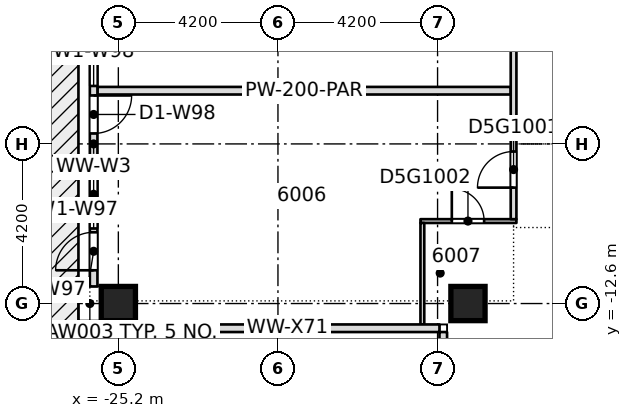
"""IFC4 building model, lengths in metres.
Left out: names, types, materials, properties, quantities, classifications, styles, units other than length and angle.
Written with IfcOpenShell. Run it as: python <this file> out.ifc"""

import sys

from ifc_helpers import new_model, si_unit, direction, frame, frame_2d, origin, origin_2d, place, context, subcontext, project, spatial, rectangle, extrude, element, fill, save


model = new_model("IFC4")
c1 = context("Model", 3, precision=1e-05, world=origin(), true_north=direction((0.0, 1.0)))
c2 = subcontext(c1, "Body", "Model", "MODEL_VIEW")
j1 = project(units=[si_unit("LENGTHUNIT", "METRE"), si_unit("PLANEANGLEUNIT", "RADIAN")], contexts=[c1])
p1 = place(None, origin())
s1 = spatial("IfcSite", under=j1, at=p1, CompositionType="ELEMENT")
p2 = place(p1, origin())
s2 = spatial("IfcBuilding", under=s1, at=p2, CompositionType="ELEMENT")
p3 = place(p2, frame((0.0, 0.0, 230.35)))
s3 = spatial("IfcBuildingStorey", under=s2, at=p3, CompositionType="ELEMENT", Elevation=230.35)
for number, where, z_axis, x_axis in (
    (1, (-25.2, -12.6, -0.4), (0.0, 0.0, 1.0), (1.0, 0.0, 0.0)),
    (2, (-16.0, -12.6, -0.4), (0.0, 0.0, 1.0), (1.0, 0.0, 0.0)),
):
    element("IfcColumn", number, at=place(p3, frame(where, z_axis=z_axis, x_axis=x_axis)), inside=s3, PredefinedType="COLUMN", context=c2, shape_type="SweptSolid", body=[
        extrude(rectangle(XDim=0.9, YDim=0.9, at=origin_2d()), origin(), (0.0, 0.0, 1.0), 3.45),
    ])
p4 = place(p3, frame((-17.25, -10.43, 0.0), z_axis=(0.0, 0.0, 1.0), x_axis=(1.0, 0.0, 0.0)))
e3 = element("IfcWall", 3, at=p4, inside=s3, PredefinedType="PARTITIONING", context=c2, shape_type="SweptSolid", body=[
    extrude(rectangle(XDim=2.525, YDim=0.1, at=frame_2d((1.262, 0.0))), origin(), (0.0, 0.0, 1.0), 3.05),
])
p5 = place(p4, frame((0.825, 0.0, 0.0)))
e4 = element("IfcOpeningElement", 4, at=p5, cuts=e3, PredefinedType="OPENING", context=c2, shape_type="SweptSolid", body=[
    extrude(rectangle(XDim=0.85, YDim=2.1, at=frame_2d((0.425, 1.05))), frame((0.0, 0.06, 0.0), z_axis=(0.0, -1.0, 0.0), x_axis=(1.0, 0.0, 0.0)), (0.0, 0.0, 1.0), 0.12),
])
p6 = place(p3, frame((-25.75, -7.0, 0.0), z_axis=(0.0, 0.0, 1.0), x_axis=(1.0, 0.0, 0.0)))
e5 = element("IfcWall", 5, at=p6, inside=s3, PredefinedType="PARTITIONING", context=c2, shape_type="SweptSolid", body=[
    extrude(rectangle(XDim=10.875, YDim=0.2, at=frame_2d((5.438, 0.0))), origin(), (0.0, 0.0, 1.0), 3.05),
])
p7 = place(p3, frame((-17.2, -13.15, 0.0), z_axis=(0.0, 0.0, 1.0), x_axis=(0.0, 1.0, 0.0)))
e6 = element("IfcWall", 6, at=p7, inside=s3, PredefinedType="PARTITIONING", context=c2, shape_type="SweptSolid", body=[
    extrude(rectangle(XDim=2.67, YDim=0.1, at=frame_2d((1.335, 0.0))), origin(), (0.0, 0.0, 1.0), 3.05),
])
p8 = place(p3, frame((-14.8, -10.38, 0.0), z_axis=(0.0, 0.0, 1.0), x_axis=(0.0, 1.0, 0.0)))
e7 = element("IfcWall", 7, at=p8, inside=s3, PredefinedType="PARTITIONING", context=c2, shape_type="SweptSolid", body=[
    extrude(rectangle(XDim=20.805, YDim=0.15, at=frame_2d((10.402, 0.0))), origin(), (0.0, 0.0, 1.0), 3.05),
])
p9 = place(p8, frame((0.83, 0.0, 0.0)))
e8 = element("IfcOpeningElement", 8, at=p9, cuts=e7, PredefinedType="OPENING", context=c2, shape_type="SweptSolid", body=[
    extrude(rectangle(XDim=0.95, YDim=2.1, at=frame_2d((0.475, 1.05))), frame((0.0, 0.085, 0.0), z_axis=(0.0, -1.0, 0.0), x_axis=(1.0, 0.0, 0.0)), (0.0, 0.0, 1.0), 0.17),
])
p10 = place(p8, frame((9.83, 0.0, 0.0)))
e9 = element("IfcOpeningElement", 9, at=p10, cuts=e7, PredefinedType="OPENING", context=c2, shape_type="SweptSolid", body=[
    extrude(rectangle(XDim=1.1, YDim=2.1, at=frame_2d((0.55, 1.05))), frame((0.0, 0.085, 0.0), z_axis=(0.0, -1.0, 0.0), x_axis=(1.0, 0.0, 0.0)), (0.0, 0.0, 1.0), 0.17),
])
p11 = place(p8, frame((4.68, 0.0, 0.0)))
e10 = element("IfcOpeningElement", 10, at=p11, cuts=e7, PredefinedType="OPENING", context=c2, shape_type="SweptSolid", body=[
    extrude(rectangle(XDim=1.0, YDim=2.1, at=frame_2d((0.5, 1.05))), frame((0.0, 0.085, 0.0), z_axis=(0.0, -1.0, 0.0), x_axis=(1.0, 0.0, 0.0)), (0.0, 0.0, 1.0), 0.17),
])
p12 = place(p3, frame((-25.85, -4.65, 0.0), z_axis=(0.0, 0.0, 1.0), x_axis=(0.0, -1.0, 0.0)))
e11 = element("IfcWall", 11, at=p12, inside=s3, PredefinedType="STANDARD", context=c2, shape_type="SweptSolid", body=[
    extrude(rectangle(XDim=7.5, YDim=0.2, at=frame_2d((3.75, 0.0))), origin(), (0.0, 0.0, 1.0), 3.05),
])
p13 = place(p12, frame((4.175, 0.0, 0.2)))
e12 = element("IfcOpeningElement", 12, at=p13, cuts=e11, PredefinedType="OPENING", context=c2, shape_type="SweptSolid", body=[
    extrude(rectangle(XDim=1.8, YDim=2.65, at=frame_2d((0.9, 1.325))), frame((0.0, 0.11, 0.0), z_axis=(0.0, -1.0, 0.0), x_axis=(1.0, 0.0, 0.0)), (0.0, 0.0, 1.0), 0.22),
])
p14 = place(p12, frame((6.075, 0.0, 0.0)))
e13 = element("IfcOpeningElement", 13, at=p14, cuts=e11, PredefinedType="OPENING", context=c2, shape_type="SweptSolid", body=[
    extrude(rectangle(XDim=1.0, YDim=2.4, at=frame_2d((0.5, 1.2))), frame((0.0, 0.11, 0.0), z_axis=(0.0, -1.0, 0.0), x_axis=(1.0, 0.0, 0.0)), (0.0, 0.0, 1.0), 0.22),
])
p15 = place(p12, frame((0.425, 0.0, 0.2)))
e14 = element("IfcOpeningElement", 14, at=p15, cuts=e11, PredefinedType="OPENING", context=c2, shape_type="SweptSolid", body=[
    extrude(rectangle(XDim=1.8, YDim=2.65, at=frame_2d((0.9, 1.325))), frame((0.0, 0.11, 0.0), z_axis=(0.0, -1.0, 0.0), x_axis=(1.0, 0.0, 0.0)), (0.0, 0.0, 1.0), 0.22),
])
p16 = place(p12, frame((2.475, 0.0, 0.0)))
e15 = element("IfcOpeningElement", 15, at=p16, cuts=e11, PredefinedType="OPENING", context=c2, shape_type="SweptSolid", body=[
    extrude(rectangle(XDim=1.0, YDim=2.4, at=frame_2d((0.5, 1.2))), frame((0.0, 0.11, 0.0), z_axis=(0.0, -1.0, 0.0), x_axis=(1.0, 0.0, 0.0)), (0.0, 0.0, 1.0), 0.22),
])
p17 = place(p3, frame((-24.75, -13.25, 0.0), z_axis=(0.0, 0.0, 1.0), x_axis=(1.0, 0.0, 0.0)))
e16 = element("IfcWall", 16, at=p17, inside=s3, PredefinedType="STANDARD", context=c2, shape_type="SweptSolid", body=[
    extrude(rectangle(XDim=8.0, YDim=0.2, at=frame_2d((4.0, 0.0))), origin(), (0.0, 0.0, 1.0), 3.05),
])
p18 = place(p3, frame((-16.65, -13.35, 0.0), z_axis=(0.0, 0.0, 1.0), x_axis=(0.0, -1.0, 0.0)))
e17 = element("IfcWall", 17, at=p18, inside=s3, PredefinedType="STANDARD", context=c2, shape_type="SweptSolid", body=[
    extrude(rectangle(XDim=7.2, YDim=0.2, at=frame_2d((3.6, 0.0))), origin(), (0.0, 0.0, 1.0), 3.05),
])
p19 = place(p18, frame((3.875, 0.0, 0.2)))
e18 = element("IfcOpeningElement", 18, at=p19, cuts=e17, PredefinedType="OPENING", context=c2, shape_type="SweptSolid", body=[
    extrude(rectangle(XDim=1.8, YDim=2.65, at=frame_2d((0.9, 1.325))), frame((0.0, 0.11, 0.0), z_axis=(0.0, -1.0, 0.0), x_axis=(1.0, 0.0, 0.0)), (0.0, 0.0, 1.0), 0.22),
])
p20 = place(p18, frame((0.275, 0.0, 0.2)))
e19 = element("IfcOpeningElement", 19, at=p20, cuts=e17, PredefinedType="OPENING", context=c2, shape_type="SweptSolid", body=[
    extrude(rectangle(XDim=1.8, YDim=2.65, at=frame_2d((0.9, 1.325))), frame((0.0, 0.11, 0.0), z_axis=(0.0, -1.0, 0.0), x_axis=(1.0, 0.0, 0.0)), (0.0, 0.0, 1.0), 0.22),
])
p21 = place(p9, origin())
e20 = element("IfcDoor", 20, at=p21, inside=s3, OperationType="SINGLE_SWING_LEFT", PredefinedType="DOOR", context=c2, shape_type="SweptSolid", body=[
    extrude(rectangle(XDim=0.95, YDim=2.1, at=frame_2d((0.475, 1.05))), frame((0.0, 0.025, 0.0), z_axis=(0.0, -1.0, 0.0), x_axis=(1.0, 0.0, 0.0)), (0.0, 0.0, 1.0), 0.05),
])
fill(e8, e20)
p22 = place(p5, origin())
e21 = element("IfcDoor", 21, at=p22, inside=s3, OperationType="SINGLE_SWING_RIGHT", PredefinedType="DOOR", context=c2, shape_type="SweptSolid", body=[
    extrude(rectangle(XDim=0.85, YDim=2.1, at=frame_2d((0.425, 1.05))), frame((0.0, 0.025, 0.0), z_axis=(0.0, -1.0, 0.0), x_axis=(1.0, 0.0, 0.0)), (0.0, 0.0, 1.0), 0.05),
])
fill(e4, e21)
p23 = place(p13, origin())
e22 = element("IfcWindow", 22, at=p23, inside=s3, PartitioningType="SINGLE_PANEL", PredefinedType="WINDOW", context=c2, shape_type="SweptSolid", body=[
    extrude(rectangle(XDim=1.8, YDim=2.65, at=frame_2d((0.9, 1.325))), frame((0.0, 0.03, 0.0), z_axis=(0.0, -1.0, 0.0), x_axis=(1.0, 0.0, 0.0)), (0.0, 0.0, 1.0), 0.06),
])
fill(e12, e22)
p24 = place(p14, origin())
e23 = element("IfcDoor", 23, at=p24, inside=s3, OperationType="SINGLE_SWING_LEFT", PredefinedType="DOOR", context=c2, shape_type="SweptSolid", body=[
    extrude(rectangle(XDim=1.0, YDim=2.4, at=frame_2d((0.5, 1.2))), frame((0.0, 0.025, 0.0), z_axis=(0.0, -1.0, 0.0), x_axis=(1.0, 0.0, 0.0)), (0.0, 0.0, 1.0), 0.05),
])
fill(e13, e23)
p25 = place(p15, origin())
e24 = element("IfcWindow", 24, at=p25, inside=s3, PartitioningType="SINGLE_PANEL", PredefinedType="WINDOW", context=c2, shape_type="SweptSolid", body=[
    extrude(rectangle(XDim=1.8, YDim=2.65, at=frame_2d((0.9, 1.325))), frame((0.0, 0.03, 0.0), z_axis=(0.0, -1.0, 0.0), x_axis=(1.0, 0.0, 0.0)), (0.0, 0.0, 1.0), 0.06),
])
fill(e14, e24)
p26 = place(p16, origin())
e25 = element("IfcDoor", 25, at=p26, inside=s3, OperationType="SINGLE_SWING_LEFT", PredefinedType="DOOR", context=c2, shape_type="SweptSolid", body=[
    extrude(rectangle(XDim=1.0, YDim=2.4, at=frame_2d((0.5, 1.2))), frame((0.0, 0.025, 0.0), z_axis=(0.0, -1.0, 0.0), x_axis=(1.0, 0.0, 0.0)), (0.0, 0.0, 1.0), 0.05),
])
fill(e15, e25)
save(model, sys.argv[1])
